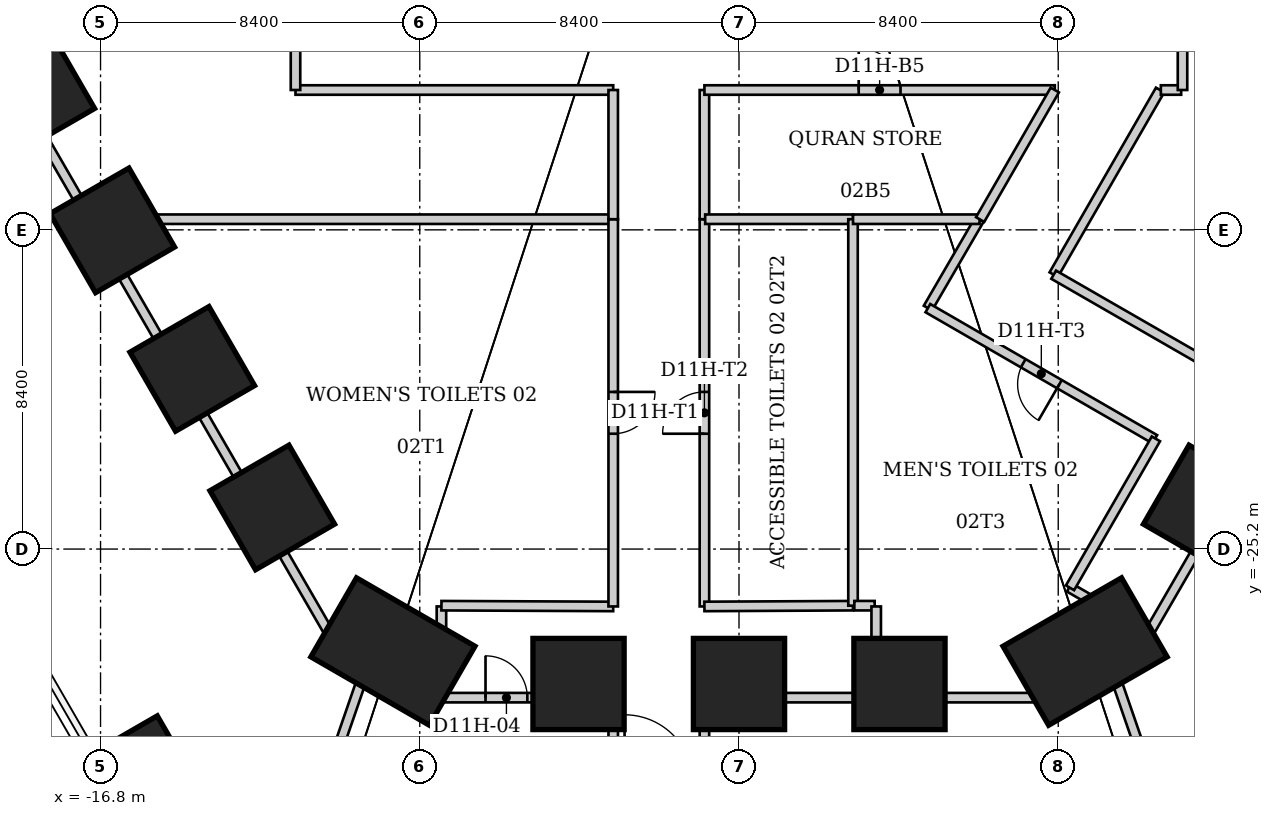
"""IFC4 building model, lengths in metres.
Left out: names, types, materials, properties, quantities, classifications, styles, units other than length and angle.
Written with IfcOpenShell. Run it as: python <this file> out.ifc"""

import sys

from ifc_helpers import new_model, si_unit, direction, frame, frame_2d, origin, origin_2d, place, context, subcontext, project, spatial, rectangle, extrude, element, fill, save


model = new_model("IFC4")
c1 = context("Model", 3, precision=1e-05, world=origin(), true_north=direction((0.0, 1.0)))
c2 = subcontext(c1, "Body", "Model", "MODEL_VIEW")
j1 = project(units=[si_unit("LENGTHUNIT", "METRE"), si_unit("PLANEANGLEUNIT", "RADIAN")], contexts=[c1])
p1 = place(None, origin())
s1 = spatial("IfcSite", under=j1, at=p1, CompositionType="ELEMENT")
p2 = place(p1, origin())
s2 = spatial("IfcBuilding", under=s1, at=p2, CompositionType="ELEMENT")
p3 = place(p2, frame((0.0, 0.0, 12.0)))
s3 = spatial("IfcBuildingStorey", under=s2, at=p3, CompositionType="ELEMENT", Elevation=12.0)
p4 = place(p3, frame((12.282, -24.105, 0.0), z_axis=(0.0, 0.0, 1.0), x_axis=(0.866025403784, -0.5, 0.0)))
e1 = element("IfcColumn", 1, at=p4, inside=s3, PredefinedType="COLUMN", context=c2, shape_type="SweptSolid", body=[
    extrude(rectangle(XDim=2.4, YDim=2.4, at=origin_2d()), origin(), (0.0, 0.0, 1.0), 6.0),
])
p5 = place(p3, frame((9.106, -27.897, 0.0), z_axis=(0.0, 0.0, 1.0), x_axis=(0.5, -0.866025403784, 0.0)))
e2 = element("IfcColumn", 2, at=p5, inside=s3, PredefinedType="COLUMN", context=c2, shape_type="SweptSolid", body=[
    extrude(rectangle(XDim=2.4, YDim=3.6, at=origin_2d()), origin(), (0.0, 0.0, 1.0), 6.0),
])
for number, where, z_axis, x_axis in (
    (3, (4.222, -28.751, 0.0), (0.0, 0.0, 1.0), (0.0, -1.0, 0.0)),
    (4, (0.0, -28.751, 0.0), (0.0, 0.0, 1.0), (0.0, -1.0, 0.0)),
    (5, (-4.222, -28.751, 0.0), (0.0, 0.0, 1.0), (0.0, -1.0, 0.0)),
):
    element("IfcColumn", number, at=place(p3, frame(where, z_axis=z_axis, x_axis=x_axis)), inside=s3, PredefinedType="COLUMN", context=c2, shape_type="SweptSolid", body=[
        extrude(rectangle(XDim=2.4, YDim=2.4, at=origin_2d()), origin(), (0.0, 0.0, 1.0), 6.0),
    ])
p6 = place(p3, frame((-9.106, -27.897, 0.0), z_axis=(0.0, 0.0, 1.0), x_axis=(-0.5, -0.866025403784, 0.0)))
e6 = element("IfcColumn", 6, at=p6, inside=s3, PredefinedType="COLUMN", context=c2, shape_type="SweptSolid", body=[
    extrude(rectangle(XDim=2.4, YDim=3.6, at=origin_2d()), origin(), (0.0, 0.0, 1.0), 6.0),
])
for number, where, z_axis, x_axis in (
    (7, (-12.282, -24.105, 0.0), (0.0, 0.0, 1.0), (-0.866, -0.5, 0.0)),
    (8, (-14.387, -20.459, 0.0), (0.0, 0.0, 1.0), (-0.866, -0.5, 0.0)),
    (9, (-16.491, -16.813, 0.0), (0.0, 0.0, 1.0), (-0.866, -0.5, 0.0)),
    (10, (-18.596, -13.167, 0.0), (0.0, 0.0, 1.0), (-0.866, -0.5, 0.0)),
):
    element("IfcColumn", number, at=place(p3, frame(where, z_axis=z_axis, x_axis=x_axis)), inside=s3, PredefinedType="COLUMN", context=c2, shape_type="SweptSolid", body=[
        extrude(rectangle(XDim=2.4, YDim=2.4, at=origin_2d()), origin(), (0.0, 0.0, 1.0), 6.0),
    ])
p7 = place(p3, frame((-15.563, -30.546, 0.0), z_axis=(0.0, 0.0, 1.0), x_axis=(-0.866025403784, -0.5, 0.0)))
e11 = element("IfcColumn", 11, at=p7, inside=s3, PredefinedType="COLUMN", context=c2, shape_type="SweptSolid", body=[
    extrude(rectangle(XDim=1.4, YDim=1.4, at=origin_2d()), origin(), (0.0, 0.0, 1.0), 6.0),
])
p8 = place(p3, frame((-43.144, 7.063, 0.0), z_axis=(0.0, 0.0, 1.0), x_axis=(0.500000660882, -0.866025022224, 0.0)))
e12 = element("IfcWall", 12, at=p8, inside=s3, PredefinedType="PARAPET", context=c2, shape_type="SweptSolid", body=[
    extrude(rectangle(XDim=55.377, YDim=0.25, at=frame_2d((27.688, 0.0))), origin(), (0.0, 0.0, 1.0), 1.1),
])
p9 = place(p3, frame((-22.682, -6.821, 0.0), z_axis=(0.0, 0.0, 1.0), x_axis=(0.500140682179, -0.865944165654, 0.0)))
e13 = element("IfcWall", 13, at=p9, inside=s3, PredefinedType="PARTITIONING", context=c2, shape_type="SweptSolid", body=[
    extrude(rectangle(XDim=11.2, YDim=0.25, at=frame_2d((5.6, 0.0))), origin(), (0.0, 0.0, 1.0), 4.04),
])
p10 = place(p3, frame((-17.08, -16.52, 0.0), z_axis=(0.0, 0.0, 1.0), x_axis=(0.500484795969, -0.865745325719, 0.0)))
e14 = element("IfcWall", 14, at=p10, inside=s3, PredefinedType="PARTITIONING", context=c2, shape_type="SweptSolid", body=[
    extrude(rectangle(XDim=13.387, YDim=0.25, at=frame_2d((6.694, 0.0))), origin(), (0.0, 0.0, 1.0), 4.04),
])
p11 = place(p3, frame((-12.77, -36.882, 0.0), z_axis=(0.0, 0.0, 1.0), x_axis=(0.32622518394, 0.945292086798, 0.0)))
e15 = element("IfcWall", 15, at=p11, inside=s3, PredefinedType="PARTITIONING", context=c2, shape_type="SweptSolid", body=[
    extrude(rectangle(XDim=8.951, YDim=0.25, at=frame_2d((4.476, 0.0))), origin(), (0.0, 0.0, 1.0), 5.6),
])
p12 = place(p3, frame((-11.67, -13.12, 0.0), z_axis=(0.0, 0.0, 1.0), x_axis=(1.0, 0.0, 0.0)))
e16 = element("IfcWall", 16, at=p12, inside=s3, PredefinedType="PARTITIONING", context=c2, shape_type="SweptSolid", body=[
    extrude(rectangle(XDim=8.36, YDim=0.25, at=frame_2d((4.18, 0.0))), origin(), (0.0, 0.0, 1.0), 5.84),
])
p13 = place(p3, frame((-11.67, -2.02, 0.0), z_axis=(0.0, 0.0, 1.0), x_axis=(0.0, -1.0, 0.0)))
e17 = element("IfcWall", 17, at=p13, inside=s3, PredefinedType="PARTITIONING", context=c2, shape_type="SweptSolid", body=[
    extrude(rectangle(XDim=11.1, YDim=0.25, at=frame_2d((5.55, 0.0))), origin(), (0.0, 0.0, 1.0), 5.84),
])
p14 = place(p13, frame((4.75, 0.0, 0.0)))
e18 = element("IfcOpeningElement", 18, at=p14, cuts=e17, PredefinedType="OPENING", context=c2, shape_type="SweptSolid", body=[
    extrude(rectangle(XDim=1.6, YDim=2.4, at=frame_2d((0.8, 1.2))), frame((0.0, 0.125, 0.0), z_axis=(0.0, -1.0, 0.0), x_axis=(1.0, 0.0, 0.0)), (0.0, 0.0, 1.0), 0.25),
])
p15 = place(p3, frame((-10.38, -28.11, 0.0), z_axis=(0.0, 0.0, 1.0), x_axis=(0.865714845822, -0.5005375168, 0.0)))
e19 = element("IfcWall", 19, at=p15, inside=s3, PredefinedType="PARTITIONING", context=c2, shape_type="SweptSolid", body=[
    extrude(rectangle(XDim=0.579, YDim=0.25, at=frame_2d((0.29, 0.0))), origin(), (0.0, 0.0, 1.0), 5.84),
])
p16 = place(p3, frame((-8.65, -29.11, 0.0), z_axis=(0.0, 0.0, 1.0), x_axis=(-0.866883441829, 0.498510880807, 0.0)))
e20 = element("IfcWall", 20, at=p16, inside=s3, PredefinedType="PARTITIONING", context=c2, shape_type="SweptSolid", body=[
    extrude(rectangle(XDim=1.385, YDim=0.25, at=frame_2d((0.692, 0.0))), origin(), (0.0, 0.0, 1.0), 5.84),
])
p17 = place(p3, frame((-8.65, -29.11, 0.0), z_axis=(0.0, 0.0, 1.0), x_axis=(1.0, 0.0, 0.0)))
e21 = element("IfcWall", 21, at=p17, inside=s3, PredefinedType="PARTITIONING", context=c2, shape_type="SweptSolid", body=[
    extrude(rectangle(XDim=0.82, YDim=0.25, at=frame_2d((0.41, 0.0))), origin(), (0.0, 0.0, 1.0), 5.84),
])
p18 = place(p3, frame((-7.83, -29.11, 0.0), z_axis=(0.0, 0.0, 1.0), x_axis=(0.0, 1.0, 0.0)))
e22 = element("IfcWall", 22, at=p18, inside=s3, PredefinedType="PARTITIONING", context=c2, shape_type="SweptSolid", body=[
    extrude(rectangle(XDim=2.4, YDim=0.25, at=frame_2d((1.2, 0.0))), origin(), (0.0, 0.0, 1.0), 5.84),
])
p19 = place(p3, frame((-7.83, -29.11, 0.0), z_axis=(0.0, 0.0, 1.0), x_axis=(1.0, 0.0, 0.0)))
e23 = element("IfcWall", 23, at=p19, inside=s3, PredefinedType="PARTITIONING", context=c2, shape_type="SweptSolid", body=[
    extrude(rectangle(XDim=4.52, YDim=0.25, at=frame_2d((2.26, 0.0))), origin(), (0.0, 0.0, 1.0), 4.04),
])
p20 = place(p19, frame((1.16, 0.0, 0.0)))
e24 = element("IfcOpeningElement", 24, at=p20, cuts=e23, PredefinedType="OPENING", context=c2, shape_type="SweptSolid", body=[
    extrude(rectangle(XDim=1.1, YDim=2.2, at=frame_2d((0.55, 1.1))), frame((0.0, 0.125, 0.0), z_axis=(0.0, -1.0, 0.0), x_axis=(1.0, 0.0, 0.0)), (0.0, 0.0, 1.0), 0.25),
])
p21 = place(p3, frame((-7.83, -26.69, 0.0), z_axis=(0.0, 0.0, 1.0), x_axis=(0.999990191766, -0.004429037254, 0.0)))
e25 = element("IfcWall", 25, at=p21, inside=s3, PredefinedType="PARTITIONING", context=c2, shape_type="SweptSolid", body=[
    extrude(rectangle(XDim=4.52, YDim=0.25, at=frame_2d((2.26, 0.0))), origin(), (0.0, 0.0, 1.0), 5.84),
])
p22 = place(p3, frame((-3.33, -16.52, 0.0), z_axis=(0.0, 0.0, 1.0), x_axis=(-1.0, 0.0, 0.0)))
e26 = element("IfcWall", 26, at=p22, inside=s3, PredefinedType="PARTITIONING", context=c2, shape_type="SweptSolid", body=[
    extrude(rectangle(XDim=13.75, YDim=0.25, at=frame_2d((6.875, 0.0))), origin(), (0.0, 0.0, 1.0), 5.84),
])
p23 = place(p3, frame((-3.31, -29.11, 0.0), z_axis=(0.0, 0.0, 1.0), x_axis=(0.0, -1.0, 0.0)))
e27 = element("IfcWall", 27, at=p23, inside=s3, PredefinedType="PARTITIONING", context=c2, shape_type="SweptSolid", body=[
    extrude(rectangle(XDim=2.15, YDim=0.25, at=frame_2d((1.075, 0.0))), origin(), (0.0, 0.0, 1.0), 5.6),
])
p24 = place(p3, frame((-3.31, -16.52, 0.0), z_axis=(0.0, 0.0, 1.0), x_axis=(0.0, -1.0, 0.0)))
e28 = element("IfcWall", 28, at=p24, inside=s3, PredefinedType="PARTITIONING", context=c2, shape_type="SweptSolid", body=[
    extrude(rectangle(XDim=10.19, YDim=0.25, at=frame_2d((5.095, 0.0))), origin(), (0.0, 0.0, 1.0), 5.84),
])
p25 = place(p24, frame((4.545, 0.0, 0.0)))
e29 = element("IfcOpeningElement", 29, at=p25, cuts=e28, PredefinedType="OPENING", context=c2, shape_type="SweptSolid", body=[
    extrude(rectangle(XDim=1.1, YDim=2.2, at=frame_2d((0.55, 1.1))), frame((0.0, 0.125, 0.0), z_axis=(0.0, -1.0, 0.0), x_axis=(1.0, 0.0, 0.0)), (0.0, 0.0, 1.0), 0.25),
])
p26 = place(p3, frame((-3.31, -13.12, 0.0), z_axis=(0.0, 0.0, 1.0), x_axis=(0.0, -1.0, 0.0)))
e30 = element("IfcWall", 30, at=p26, inside=s3, PredefinedType="PARTITIONING", context=c2, shape_type="SweptSolid", body=[
    extrude(rectangle(XDim=3.4, YDim=0.25, at=frame_2d((1.7, 0.0))), origin(), (0.0, 0.0, 1.0), 5.84),
])
p27 = place(p3, frame((-0.91, -31.26, 0.0), z_axis=(0.0, 0.0, 1.0), x_axis=(0.0, 1.0, 0.0)))
e31 = element("IfcWall", 31, at=p27, inside=s3, PredefinedType="PARTITIONING", context=c2, shape_type="SweptSolid", body=[
    extrude(rectangle(XDim=2.15, YDim=0.25, at=frame_2d((1.075, 0.0))), origin(), (0.0, 0.0, 1.0), 5.6),
])
p28 = place(p3, frame((-0.91, -29.11, 0.0), z_axis=(0.0, 0.0, 1.0), x_axis=(1.0, 0.0, 0.0)))
e32 = element("IfcWall", 32, at=p28, inside=s3, PredefinedType="PARTITIONING", context=c2, shape_type="SweptSolid", body=[
    extrude(rectangle(XDim=4.52, YDim=0.25, at=frame_2d((2.26, 0.0))), origin(), (0.0, 0.0, 1.0), 4.04),
])
p29 = place(p3, frame((-0.91, -26.71, 0.0), z_axis=(0.0, 0.0, 1.0), x_axis=(0.0, 1.0, 0.0)))
e33 = element("IfcWall", 33, at=p29, inside=s3, PredefinedType="PARTITIONING", context=c2, shape_type="SweptSolid", body=[
    extrude(rectangle(XDim=10.19, YDim=0.25, at=frame_2d((5.095, 0.0))), origin(), (0.0, 0.0, 1.0), 5.84),
])
p30 = place(p29, frame((4.545, 0.0, 0.0)))
e34 = element("IfcOpeningElement", 34, at=p30, cuts=e33, PredefinedType="OPENING", context=c2, shape_type="SweptSolid", body=[
    extrude(rectangle(XDim=1.1, YDim=2.2, at=frame_2d((0.55, 1.1))), frame((0.0, 0.125, 0.0), z_axis=(0.0, -1.0, 0.0), x_axis=(1.0, 0.0, 0.0)), (0.0, 0.0, 1.0), 0.25),
])
p31 = place(p3, frame((-0.91, -26.71, 0.0), z_axis=(0.0, 0.0, 1.0), x_axis=(0.999986892035, 0.005120132697, 0.0)))
e35 = element("IfcWall", 35, at=p31, inside=s3, PredefinedType="PARTITIONING", context=c2, shape_type="SweptSolid", body=[
    extrude(rectangle(XDim=3.91, YDim=0.25, at=frame_2d((1.955, 0.0))), origin(), (0.0, 0.0, 1.0), 5.84),
])
p32 = place(p3, frame((-0.91, -16.52, 0.0), z_axis=(0.0, 0.0, 1.0), x_axis=(0.0, 1.0, 0.0)))
e36 = element("IfcWall", 36, at=p32, inside=s3, PredefinedType="PARTITIONING", context=c2, shape_type="SweptSolid", body=[
    extrude(rectangle(XDim=3.4, YDim=0.25, at=frame_2d((1.7, 0.0))), origin(), (0.0, 0.0, 1.0), 5.84),
])
p33 = place(p3, frame((-0.91, -13.12, 0.0), z_axis=(0.0, 0.0, 1.0), x_axis=(1.0, 0.0, 0.0)))
e37 = element("IfcWall", 37, at=p33, inside=s3, PredefinedType="PARTITIONING", context=c2, shape_type="SweptSolid", body=[
    extrude(rectangle(XDim=9.22, YDim=0.25, at=frame_2d((4.61, 0.0))), origin(), (0.0, 0.0, 1.0), 5.84),
])
p34 = place(p33, frame((4.06, 0.0, 0.0)))
e38 = element("IfcOpeningElement", 38, at=p34, cuts=e37, PredefinedType="OPENING", context=c2, shape_type="SweptSolid", body=[
    extrude(rectangle(XDim=1.1, YDim=2.2, at=frame_2d((0.55, 1.1))), frame((0.0, 0.125, 0.0), z_axis=(0.0, -1.0, 0.0), x_axis=(1.0, 0.0, 0.0)), (0.0, 0.0, 1.0), 0.25),
])
p35 = place(p3, frame((3.0, -16.52, 0.0), z_axis=(0.0, 0.0, 1.0), x_axis=(-1.0, 0.0, 0.0)))
e39 = element("IfcWall", 39, at=p35, inside=s3, PredefinedType="PARTITIONING", context=c2, shape_type="SweptSolid", body=[
    extrude(rectangle(XDim=3.89, YDim=0.25, at=frame_2d((1.945, 0.0))), origin(), (0.0, 0.0, 1.0), 5.84),
])
p36 = place(p3, frame((3.0, -16.52, 0.0), z_axis=(0.0, 0.0, 1.0), x_axis=(0.0, -1.0, 0.0)))
e40 = element("IfcWall", 40, at=p36, inside=s3, PredefinedType="PARTITIONING", context=c2, shape_type="SweptSolid", body=[
    extrude(rectangle(XDim=10.17, YDim=0.25, at=frame_2d((5.085, 0.0))), origin(), (0.0, 0.0, 1.0), 5.84),
])
p37 = place(p3, frame((3.035, -26.69, 0.0), z_axis=(0.0, 0.0, 1.0), x_axis=(1.0, 0.0, 0.0)))
e41 = element("IfcWall", 41, at=p37, inside=s3, PredefinedType="PARTITIONING", context=c2, shape_type="SweptSolid", body=[
    extrude(rectangle(XDim=0.535, YDim=0.25, at=frame_2d((0.268, 0.0))), origin(), (0.0, 0.0, 1.0), 5.84),
])
p38 = place(p3, frame((3.61, -29.11, 0.0), z_axis=(0.0, 0.0, 1.0), x_axis=(1.0, 0.0, 0.0)))
e42 = element("IfcWall", 42, at=p38, inside=s3, PredefinedType="PARTITIONING", context=c2, shape_type="SweptSolid", body=[
    extrude(rectangle(XDim=5.04, YDim=0.25, at=frame_2d((2.52, 0.0))), origin(), (0.0, 0.0, 1.0), 4.04),
])
p39 = place(p3, frame((3.61, -26.71, 0.0), z_axis=(0.0, 0.0, 1.0), x_axis=(0.0, -1.0, 0.0)))
e43 = element("IfcWall", 43, at=p39, inside=s3, PredefinedType="PARTITIONING", context=c2, shape_type="SweptSolid", body=[
    extrude(rectangle(XDim=2.4, YDim=0.25, at=frame_2d((1.2, 0.0))), origin(), (0.0, 0.0, 1.0), 5.84),
])
p40 = place(p3, frame((4.97, -18.86, 0.0), z_axis=(0.0, 0.0, 1.0), x_axis=(0.502507574725, 0.864572806271, 0.0)))
e44 = element("IfcWall", 44, at=p40, inside=s3, PredefinedType="PARTITIONING", context=c2, shape_type="SweptSolid", body=[
    extrude(rectangle(XDim=2.707, YDim=0.25, at=frame_2d((1.353, 0.0))), origin(), (0.0, 0.0, 1.0), 5.84),
])
p41 = place(p3, frame((6.33, -16.52, 0.0), z_axis=(0.0, 0.0, 1.0), x_axis=(-1.0, 0.0, 0.0)))
e45 = element("IfcWall", 45, at=p41, inside=s3, PredefinedType="PARTITIONING", context=c2, shape_type="SweptSolid", body=[
    extrude(rectangle(XDim=3.33, YDim=0.25, at=frame_2d((1.665, 0.0))), origin(), (0.0, 0.0, 1.0), 5.84),
])
p42 = place(p3, frame((8.28, -17.98, 0.0), z_axis=(0.0, 0.0, 1.0), x_axis=(0.499206132958, 0.866483258244, 0.0)))
e46 = element("IfcWall", 46, at=p42, inside=s3, PredefinedType="PARTITIONING", context=c2, shape_type="SweptSolid", body=[
    extrude(rectangle(XDim=5.609, YDim=0.25, at=frame_2d((2.804, 0.0))), origin(), (0.0, 0.0, 1.0), 5.84),
])
p43 = place(p3, frame((8.31, -13.12, 0.0), z_axis=(0.0, 0.0, 1.0), x_axis=(-0.499589939021, -0.866262023194, 0.0)))
e47 = element("IfcWall", 47, at=p43, inside=s3, PredefinedType="PARTITIONING", context=c2, shape_type="SweptSolid", body=[
    extrude(rectangle(XDim=3.934, YDim=0.25, at=frame_2d((1.967, 0.0))), origin(), (0.0, 0.0, 1.0), 5.84),
])
p44 = place(p3, frame((8.65, -29.11, 0.0), z_axis=(0.0, 0.0, 1.0), x_axis=(0.865736025111, 0.500500883941, 0.0)))
e48 = element("IfcWall", 48, at=p44, inside=s3, PredefinedType="PARTITIONING", context=c2, shape_type="SweptSolid", body=[
    extrude(rectangle(XDim=1.384, YDim=0.25, at=frame_2d((0.692, 0.0))), origin(), (0.0, 0.0, 1.0), 5.84),
])
p45 = place(p3, frame((8.69, -26.21, 0.0), z_axis=(0.0, 0.0, 1.0), x_axis=(0.865442434468, -0.5010083758, 0.0)))
e49 = element("IfcWall", 49, at=p45, inside=s3, PredefinedType="PARTITIONING", context=c2, shape_type="SweptSolid", body=[
    extrude(rectangle(XDim=2.415, YDim=0.25, at=frame_2d((1.208, 0.0))), origin(), (0.0, 0.0, 1.0), 5.84),
])
p46 = place(p3, frame((10.38, -28.11, 0.0), z_axis=(0.0, 0.0, 1.0), x_axis=(-0.865714845822, -0.5005375168, 0.0)))
e50 = element("IfcWall", 50, at=p46, inside=s3, PredefinedType="PARTITIONING", context=c2, shape_type="SweptSolid", body=[
    extrude(rectangle(XDim=0.579, YDim=0.25, at=frame_2d((0.29, 0.0))), origin(), (0.0, 0.0, 1.0), 5.84),
])
p47 = place(p3, frame((10.78, -27.42, 0.0), z_axis=(0.0, 0.0, 1.0), x_axis=(0.501133997532, 0.86536969933, 0.0)))
e51 = element("IfcWall", 51, at=p47, inside=s3, PredefinedType="PARTITIONING", context=c2, shape_type="SweptSolid", body=[
    extrude(rectangle(XDim=4.53, YDim=0.25, at=frame_2d((2.265, 0.0))), origin(), (0.0, 0.0, 1.0), 4.04),
])
p48 = place(p3, frame((10.79, -27.42, 0.0), z_axis=(0.0, 0.0, 1.0), x_axis=(-0.510777713782, -0.859712816645, 0.0)))
e52 = element("IfcWall", 52, at=p48, inside=s3, PredefinedType="PARTITIONING", context=c2, shape_type="SweptSolid", body=[
    extrude(rectangle(XDim=0.802, YDim=0.25, at=frame_2d((0.401, 0.0))), origin(), (0.0, 0.0, 1.0), 5.84),
])
p49 = place(p3, frame((10.94, -22.31, 0.0), z_axis=(0.0, 0.0, 1.0), x_axis=(-0.865825192556, 0.500346615794, 0.0)))
e53 = element("IfcWall", 53, at=p49, inside=s3, PredefinedType="PARTITIONING", context=c2, shape_type="SweptSolid", body=[
    extrude(rectangle(XDim=6.895, YDim=0.25, at=frame_2d((3.448, 0.0))), origin(), (0.0, 0.0, 1.0), 5.84),
])
p50 = place(p49, frame((2.898, 0.0, 0.0)))
e54 = element("IfcOpeningElement", 54, at=p50, cuts=e53, PredefinedType="OPENING", context=c2, shape_type="SweptSolid", body=[
    extrude(rectangle(XDim=1.1, YDim=2.2, at=frame_2d((0.55, 1.1))), frame((0.0, 0.125, 0.0), z_axis=(0.0, -1.0, 0.0), x_axis=(1.0, 0.0, 0.0)), (0.0, 0.0, 1.0), 0.25),
])
p51 = place(p3, frame((10.97, -22.3, 0.0), z_axis=(0.0, 0.0, 1.0), x_axis=(-0.499476424687, -0.86632747918, 0.0)))
e55 = element("IfcWall", 55, at=p51, inside=s3, PredefinedType="PARTITIONING", context=c2, shape_type="SweptSolid", body=[
    extrude(rectangle(XDim=4.525, YDim=0.25, at=frame_2d((2.262, 0.0))), origin(), (0.0, 0.0, 1.0), 5.84),
])
p52 = place(p3, frame((11.1, -13.12, 0.0), z_axis=(0.0, 0.0, 1.0), x_axis=(1.0, 0.0, 0.0)))
e56 = element("IfcWall", 56, at=p52, inside=s3, PredefinedType="PARTITIONING", context=c2, shape_type="SweptSolid", body=[
    extrude(rectangle(XDim=0.535, YDim=0.25, at=frame_2d((0.268, 0.0))), origin(), (0.0, 0.0, 1.0), 5.84),
])
p53 = place(p3, frame((11.67, -13.12, 0.0), z_axis=(0.0, 0.0, 1.0), x_axis=(0.0, 1.0, 0.0)))
e57 = element("IfcWall", 57, at=p53, inside=s3, PredefinedType="PARTITIONING", context=c2, shape_type="SweptSolid", body=[
    extrude(rectangle(XDim=17.32, YDim=0.25, at=frame_2d((8.66, 0.0))), origin(), (0.0, 0.0, 1.0), 5.84),
])
p54 = place(p53, frame((7.86, 0.0, 0.0)))
e58 = element("IfcOpeningElement", 58, at=p54, cuts=e57, PredefinedType="OPENING", context=c2, shape_type="SweptSolid", body=[
    extrude(rectangle(XDim=1.6, YDim=2.4, at=frame_2d((0.8, 1.2))), frame((0.0, 0.125, 0.0), z_axis=(0.0, -1.0, 0.0), x_axis=(1.0, 0.0, 0.0)), (0.0, 0.0, 1.0), 0.25),
])
p55 = place(p3, frame((12.17, -20.22, 0.0), z_axis=(0.0, 0.0, 1.0), x_axis=(-0.866588245704, 0.499023859558, 0.0)))
e59 = element("IfcWall", 59, at=p55, inside=s3, PredefinedType="PARTITIONING", context=c2, shape_type="SweptSolid", body=[
    extrude(rectangle(XDim=4.489, YDim=0.25, at=frame_2d((2.244, 0.0))), origin(), (0.0, 0.0, 1.0), 5.84),
])
p56 = place(p3, frame((12.77, -36.882, 0.0), z_axis=(0.0, 0.0, 1.0), x_axis=(-0.32622518394, 0.945292086798, 0.0)))
e60 = element("IfcWall", 60, at=p56, inside=s3, PredefinedType="PARTITIONING", context=c2, shape_type="SweptSolid", body=[
    extrude(rectangle(XDim=8.951, YDim=0.25, at=frame_2d((4.476, 0.0))), origin(), (0.0, 0.0, 1.0), 5.6),
])
p57 = place(p20, origin())
e61 = element("IfcDoor", 61, at=p57, inside=s3, OperationType="SINGLE_SWING_LEFT", PredefinedType="DOOR", context=c2, shape_type="SweptSolid", body=[
    extrude(rectangle(XDim=1.1, YDim=2.2, at=frame_2d((0.55, 1.1))), frame((0.0, 0.025, 0.0), z_axis=(0.0, -1.0, 0.0), x_axis=(1.0, 0.0, 0.0)), (0.0, 0.0, 1.0), 0.05),
])
fill(e24, e61)
p58 = place(p34, origin())
e62 = element("IfcDoor", 62, at=p58, inside=s3, OperationType="SINGLE_SWING_LEFT", PredefinedType="DOOR", context=c2, shape_type="SweptSolid", body=[
    extrude(rectangle(XDim=1.1, YDim=2.2, at=frame_2d((0.55, 1.1))), frame((0.0, 0.025, 0.0), z_axis=(0.0, -1.0, 0.0), x_axis=(1.0, 0.0, 0.0)), (0.0, 0.0, 1.0), 0.05),
])
fill(e38, e62)
p59 = place(p25, origin())
e63 = element("IfcDoor", 63, at=p59, inside=s3, OperationType="SINGLE_SWING_LEFT", PredefinedType="DOOR", context=c2, shape_type="SweptSolid", body=[
    extrude(rectangle(XDim=1.1, YDim=2.2, at=frame_2d((0.55, 1.1))), frame((0.0, 0.025, 0.0), z_axis=(0.0, -1.0, 0.0), x_axis=(1.0, 0.0, 0.0)), (0.0, 0.0, 1.0), 0.05),
])
fill(e29, e63)
p60 = place(p30, origin())
e64 = element("IfcDoor", 64, at=p60, inside=s3, OperationType="SINGLE_SWING_LEFT", PredefinedType="DOOR", context=c2, shape_type="SweptSolid", body=[
    extrude(rectangle(XDim=1.1, YDim=2.2, at=frame_2d((0.55, 1.1))), frame((0.0, 0.025, 0.0), z_axis=(0.0, -1.0, 0.0), x_axis=(1.0, 0.0, 0.0)), (0.0, 0.0, 1.0), 0.05),
])
fill(e34, e64)
p61 = place(p50, origin())
e65 = element("IfcDoor", 65, at=p61, inside=s3, OperationType="SINGLE_SWING_LEFT", PredefinedType="DOOR", context=c2, shape_type="SweptSolid", body=[
    extrude(rectangle(XDim=1.1, YDim=2.2, at=frame_2d((0.55, 1.1))), frame((0.0, 0.025, 0.0), z_axis=(0.0, -1.0, 0.0), x_axis=(1.0, 0.0, 0.0)), (0.0, 0.0, 1.0), 0.05),
])
fill(e54, e65)
save(model, sys.argv[1])
